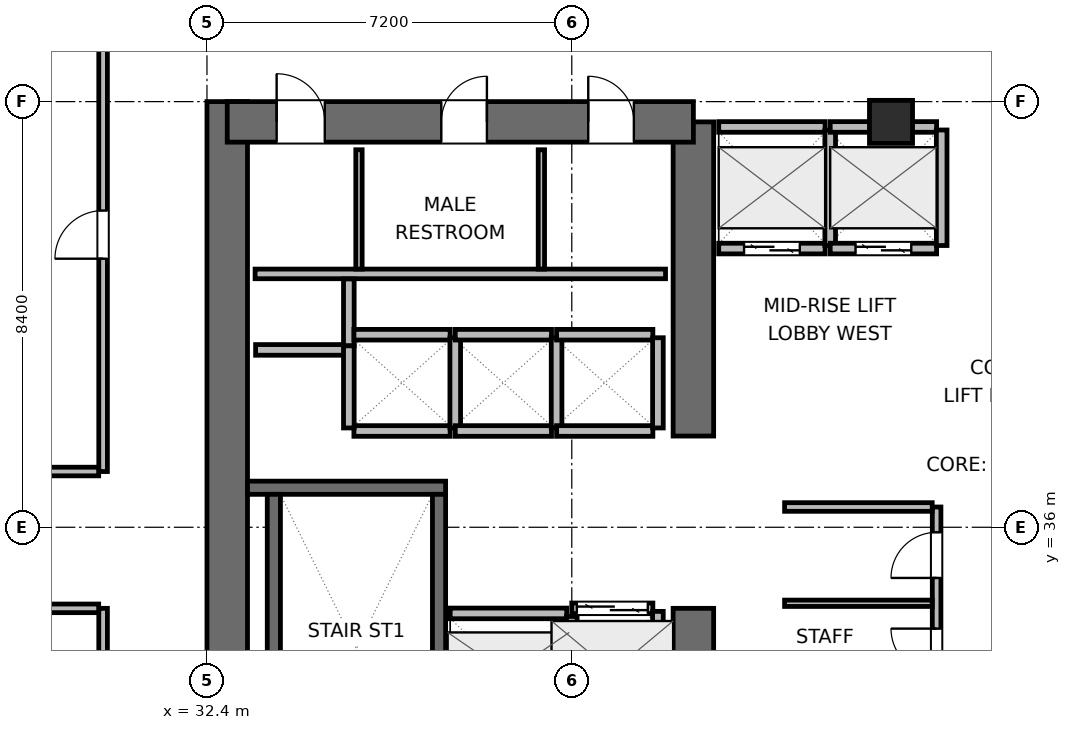
"""IFC4 building model, lengths in metres.
Left out: names, types, materials, properties, quantities, classifications, styles, units other than length and angle.
Written with IfcOpenShell. Run it as: python <this file> out.ifc"""

import sys

from ifc_helpers import new_model, si_unit, direction, frame, frame_2d, origin, origin_2d, place, context, subcontext, project, spatial, rectangle, extrude, element, fill, save


model = new_model("IFC4")
c1 = context("Model", 3, precision=1e-05, world=origin(), true_north=direction((0.0, 1.0)))
c2 = subcontext(c1, "Body", "Model", "MODEL_VIEW")
j1 = project(units=[si_unit("LENGTHUNIT", "METRE"), si_unit("PLANEANGLEUNIT", "RADIAN")], contexts=[c1])
p1 = place(None, origin())
s1 = spatial("IfcSite", under=j1, at=p1, CompositionType="ELEMENT")
p2 = place(p1, origin())
s2 = spatial("IfcBuilding", under=s1, at=p2, CompositionType="ELEMENT")
p3 = place(p2, frame((0.0, 0.0, 133.8)))
s3 = spatial("IfcBuildingStorey", under=s2, at=p3, CompositionType="ELEMENT", Elevation=133.8)
p4 = place(p3, frame((32.8, 27.6, 0.0), z_axis=(0.0, 0.0, 1.0), x_axis=(0.0, 1.0, 0.0)))
e1 = element("IfcWall", 1, at=p4, inside=s3, PredefinedType="SHEAR", context=c2, shape_type="SweptSolid", body=[
    extrude(rectangle(XDim=16.8, YDim=0.8, at=frame_2d((8.4, 0.0))), origin(), (0.0, 0.0, 1.0), 3.9),
])
p5 = place(p3, frame((42.0, 28.0, 0.0), z_axis=(0.0, 0.0, 1.0), x_axis=(0.0, 1.0, 0.0)))
e2 = element("IfcWall", 2, at=p5, inside=s3, PredefinedType="SHEAR", context=c2, shape_type="SweptSolid", body=[
    extrude(rectangle(XDim=6.4, YDim=0.8, at=frame_2d((3.2, 0.0))), origin(), (0.0, 0.0, 1.0), 3.9),
])
p6 = place(p3, frame((42.0, 37.8, 0.0), z_axis=(0.0, 0.0, 1.0), x_axis=(0.0, 1.0, 0.0)))
e3 = element("IfcWall", 3, at=p6, inside=s3, PredefinedType="SHEAR", context=c2, shape_type="SweptSolid", body=[
    extrude(rectangle(XDim=6.2, YDim=0.8, at=frame_2d((3.1, 0.0))), origin(), (0.0, 0.0, 1.0), 3.9),
])
p7 = place(p3, frame((32.8, 44.0, 0.0), z_axis=(0.0, 0.0, 1.0), x_axis=(1.0, 0.0, 0.0)))
e4 = element("IfcWall", 4, at=p7, inside=s3, PredefinedType="SHEAR", context=c2, shape_type="SweptSolid", body=[
    extrude(rectangle(XDim=9.2, YDim=0.8, at=frame_2d((4.6, 0.0))), origin(), (0.0, 0.0, 1.0), 3.9),
])
p8 = place(p7, frame((0.975, 0.0, 0.0)))
e5 = element("IfcOpeningElement", 5, at=p8, cuts=e4, PredefinedType="OPENING", context=c2, shape_type="SweptSolid", body=[
    extrude(rectangle(XDim=0.95, YDim=2.04, at=frame_2d((0.475, 1.02))), frame((0.0, 0.41, 0.0), z_axis=(0.0, -1.0, 0.0), x_axis=(1.0, 0.0, 0.0)), (0.0, 0.0, 1.0), 0.82),
])
p9 = place(p7, frame((4.225, 0.0, 0.0)))
e6 = element("IfcOpeningElement", 6, at=p9, cuts=e4, PredefinedType="OPENING", context=c2, shape_type="SweptSolid", body=[
    extrude(rectangle(XDim=0.9, YDim=2.02, at=frame_2d((0.45, 1.01))), frame((0.0, 0.41, 0.0), z_axis=(0.0, -1.0, 0.0), x_axis=(1.0, 0.0, 0.0)), (0.0, 0.0, 1.0), 0.82),
])
p10 = place(p7, frame((7.125, 0.0, 0.0)))
e7 = element("IfcOpeningElement", 7, at=p10, cuts=e4, PredefinedType="OPENING", context=c2, shape_type="SweptSolid", body=[
    extrude(rectangle(XDim=0.9, YDim=2.02, at=frame_2d((0.45, 1.01))), frame((0.0, 0.41, 0.0), z_axis=(0.0, -1.0, 0.0), x_axis=(1.0, 0.0, 0.0)), (0.0, 0.0, 1.0), 0.82),
])
p11 = place(p3, frame((33.2, 36.78, 0.0), z_axis=(0.0, 0.0, 1.0), x_axis=(1.0, 0.0, 0.0)))
e8 = element("IfcWall", 8, at=p11, inside=s3, PredefinedType="SHEAR", context=c2, shape_type="SweptSolid", body=[
    extrude(rectangle(XDim=3.91, YDim=0.26, at=frame_2d((1.955, 0.0))), origin(), (0.0, 0.0, 1.0), 3.9),
])
p12 = place(p3, frame((33.72, 29.05, 0.0), z_axis=(0.0, 0.0, 1.0), x_axis=(0.0, 1.0, 0.0)))
e9 = element("IfcWall", 9, at=p12, inside=s3, PredefinedType="SHEAR", context=c2, shape_type="SweptSolid", body=[
    extrude(rectangle(XDim=7.6, YDim=0.26, at=frame_2d((3.8, 0.0))), origin(), (0.0, 0.0, 1.0), 3.9),
])
p13 = place(p3, frame((36.98, 29.05, 0.0), z_axis=(0.0, 0.0, 1.0), x_axis=(0.0, 1.0, 0.0)))
e10 = element("IfcWall", 10, at=p13, inside=s3, PredefinedType="SHEAR", context=c2, shape_type="SweptSolid", body=[
    extrude(rectangle(XDim=7.6, YDim=0.26, at=frame_2d((3.8, 0.0))), origin(), (0.0, 0.0, 1.0), 3.9),
])
p14 = place(p13, frame((0.3, 0.0, 0.0)))
e11 = element("IfcOpeningElement", 11, at=p14, cuts=e10, PredefinedType="OPENING", context=c2, shape_type="SweptSolid", body=[
    extrude(rectangle(XDim=1.0, YDim=2.04, at=frame_2d((0.5, 1.02))), frame((0.0, 0.14, 0.0), z_axis=(0.0, -1.0, 0.0), x_axis=(1.0, 0.0, 0.0)), (0.0, 0.0, 1.0), 0.28),
])
p15 = place(p3, frame((45.9, 44.0, 0.0), z_axis=(0.0, 0.0, 1.0), x_axis=(1.0, 0.0, 0.0)))
e12 = element("IfcColumn", 12, at=p15, inside=s3, PredefinedType="COLUMN", context=c2, shape_type="SweptSolid", body=[
    extrude(rectangle(XDim=0.85, YDim=0.85, at=origin_2d()), origin(), (0.0, 0.0, 1.0), 3.9),
])
p16 = place(p3, frame((33.35, 41.0, 0.0), z_axis=(0.0, 0.0, 1.0), x_axis=(1.0, 0.0, 0.0)))
e13 = element("IfcWall", 13, at=p16, inside=s3, PredefinedType="PLUMBINGWALL", context=c2, shape_type="SweptSolid", body=[
    extrude(rectangle(XDim=8.1, YDim=0.19, at=frame_2d((4.05, 0.0))), origin(), (0.0, 0.0, 1.0), 3.64),
])
for number, where, z_axis, x_axis in (
    (14, (35.4, 41.095, 0.0), (0.0, 0.0, 1.0), (0.0, 1.0, 0.0)),
    (15, (39.0, 41.095, 0.0), (0.0, 0.0, 1.0), (0.0, 1.0, 0.0)),
):
    element("IfcWall", number, at=place(p3, frame(where, z_axis=z_axis, x_axis=x_axis)), inside=s3, PredefinedType="PARTITIONING", context=c2, shape_type="SweptSolid", body=[
        extrude(rectangle(XDim=2.355, YDim=0.125, at=frame_2d((1.177, 0.0))), origin(), (0.0, 0.0, 1.0), 3.64),
    ])
p17 = place(p3, frame((33.36, 39.5, 0.0), z_axis=(0.0, 0.0, 1.0), x_axis=(1.0, 0.0, 0.0)))
e16 = element("IfcWall", 16, at=p17, inside=s3, PredefinedType="PARTITIONING", context=c2, shape_type="SweptSolid", body=[
    extrude(rectangle(XDim=1.86, YDim=0.21, at=frame_2d((0.93, 0.0))), origin(), (0.0, 0.0, 1.0), 3.64),
])
p18 = place(p3, frame((35.2, 39.58, 0.0), z_axis=(0.0, 0.0, 1.0), x_axis=(0.0, 1.0, 0.0)))
e17 = element("IfcWall", 17, at=p18, inside=s3, PredefinedType="PARTITIONING", context=c2, shape_type="SweptSolid", body=[
    extrude(rectangle(XDim=1.32, YDim=0.21, at=frame_2d((0.66, 0.0))), origin(), (0.0, 0.0, 1.0), 3.64),
])
p19 = place(p3, frame((37.2, 34.3, 0.0), z_axis=(0.0, 0.0, 1.0), x_axis=(1.0, 0.0, 0.0)))
e18 = element("IfcWall", 18, at=p19, inside=s3, PredefinedType="PARTITIONING", context=c2, shape_type="SweptSolid", body=[
    extrude(rectangle(XDim=2.3, YDim=0.21, at=frame_2d((1.15, 0.0))), origin(), (0.0, 0.0, 1.0), 3.64),
])
p20 = place(p3, frame((39.6, 31.96, 0.0), z_axis=(0.0, 0.0, 1.0), x_axis=(0.0, 1.0, 0.0)))
e19 = element("IfcWall", 19, at=p20, inside=s3, PredefinedType="PARTITIONING", context=c2, shape_type="SweptSolid", body=[
    extrude(rectangle(XDim=2.28, YDim=0.21, at=frame_2d((1.14, 0.0))), origin(), (0.0, 0.0, 1.0), 3.64),
])
p21 = place(p3, frame((39.6, 34.4, 0.0), z_axis=(0.0, 0.0, 1.0), x_axis=(1.0, 0.0, 0.0)))
e20 = element("IfcWall", 20, at=p21, inside=s3, PredefinedType="PARTITIONING", context=c2, shape_type="SweptSolid", body=[
    extrude(rectangle(XDim=1.6, YDim=0.21, at=frame_2d((0.8, 0.0))), origin(), (0.0, 0.0, 1.0), 3.64),
])
p22 = place(p21, frame((0.1, 0.0, 0.0)))
e21 = element("IfcOpeningElement", 21, at=p22, cuts=e20, PredefinedType="OPENING", context=c2, shape_type="SweptSolid", body=[
    extrude(rectangle(XDim=1.4, YDim=2.06, at=frame_2d((0.7, 1.03))), frame((0.0, 0.115, 0.0), z_axis=(0.0, -1.0, 0.0), x_axis=(1.0, 0.0, 0.0)), (0.0, 0.0, 1.0), 0.23),
])
p23 = place(p3, frame((41.3, 31.96, 0.0), z_axis=(0.0, 0.0, 1.0), x_axis=(0.0, 1.0, 0.0)))
e22 = element("IfcWall", 22, at=p23, inside=s3, PredefinedType="PARTITIONING", context=c2, shape_type="SweptSolid", body=[
    extrude(rectangle(XDim=2.38, YDim=0.21, at=frame_2d((1.19, 0.0))), origin(), (0.0, 0.0, 1.0), 3.64),
])
p24 = place(p3, frame((42.5, 41.5, 0.0), z_axis=(0.0, 0.0, 1.0), x_axis=(1.0, 0.0, 0.0)))
e23 = element("IfcWall", 23, at=p24, inside=s3, PredefinedType="PARTITIONING", context=c2, shape_type="SweptSolid", body=[
    extrude(rectangle(XDim=2.1, YDim=0.21, at=frame_2d((1.05, 0.0))), origin(), (0.0, 0.0, 1.0), 3.64),
])
p25 = place(p24, frame((0.5, 0.0, 0.0)))
e24 = element("IfcOpeningElement", 24, at=p25, cuts=e23, PredefinedType="OPENING", context=c2, shape_type="SweptSolid", body=[
    extrude(rectangle(XDim=1.1, YDim=2.04, at=frame_2d((0.55, 1.02))), frame((0.0, 0.115, 0.0), z_axis=(0.0, -1.0, 0.0), x_axis=(1.0, 0.0, 0.0)), (0.0, 0.0, 1.0), 0.23),
])
p26 = place(p3, frame((42.5, 43.9, 0.0), z_axis=(0.0, 0.0, 1.0), x_axis=(1.0, 0.0, 0.0)))
e25 = element("IfcWall", 25, at=p26, inside=s3, PredefinedType="PARTITIONING", context=c2, shape_type="SweptSolid", body=[
    extrude(rectangle(XDim=2.1, YDim=0.21, at=frame_2d((1.05, 0.0))), origin(), (0.0, 0.0, 1.0), 2.525),
])
p27 = place(p3, frame((44.7, 41.56, 0.0), z_axis=(0.0, 0.0, 1.0), x_axis=(0.0, 1.0, 0.0)))
e26 = element("IfcWall", 26, at=p27, inside=s3, PredefinedType="PARTITIONING", context=c2, shape_type="SweptSolid", body=[
    extrude(rectangle(XDim=2.28, YDim=0.21, at=frame_2d((1.14, 0.0))), origin(), (0.0, 0.0, 1.0), 3.64),
])
p28 = place(p3, frame((44.7, 41.5, 0.0), z_axis=(0.0, 0.0, 1.0), x_axis=(1.0, 0.0, 0.0)))
e27 = element("IfcWall", 27, at=p28, inside=s3, PredefinedType="PARTITIONING", context=c2, shape_type="SweptSolid", body=[
    extrude(rectangle(XDim=2.1, YDim=0.21, at=frame_2d((1.05, 0.0))), origin(), (0.0, 0.0, 1.0), 3.64),
])
p29 = place(p28, frame((0.5, 0.0, 0.0)))
e28 = element("IfcOpeningElement", 28, at=p29, cuts=e27, PredefinedType="OPENING", context=c2, shape_type="SweptSolid", body=[
    extrude(rectangle(XDim=1.1, YDim=2.04, at=frame_2d((0.55, 1.02))), frame((0.0, 0.115, 0.0), z_axis=(0.0, -1.0, 0.0), x_axis=(1.0, 0.0, 0.0)), (0.0, 0.0, 1.0), 0.23),
])
p30 = place(p3, frame((44.7, 43.9, 0.0), z_axis=(0.0, 0.0, 1.0), x_axis=(1.0, 0.0, 0.0)))
e29 = element("IfcWall", 29, at=p30, inside=s3, PredefinedType="PARTITIONING", context=c2, shape_type="SweptSolid", body=[
    extrude(rectangle(XDim=2.1, YDim=0.21, at=frame_2d((1.05, 0.0))), origin(), (0.0, 0.0, 1.0), 2.525),
])
p31 = place(p3, frame((46.9, 41.56, 0.0), z_axis=(0.0, 0.0, 1.0), x_axis=(0.0, 1.0, 0.0)))
e30 = element("IfcWall", 30, at=p31, inside=s3, PredefinedType="PARTITIONING", context=c2, shape_type="SweptSolid", body=[
    extrude(rectangle(XDim=2.28, YDim=0.21, at=frame_2d((1.14, 0.0))), origin(), (0.0, 0.0, 1.0), 3.64),
])
for number, where, z_axis, x_axis in (
    (31, (35.3, 37.9, 0.0), (0.0, 0.0, 1.0), (1.0, 0.0, 0.0)),
    (32, (35.3, 39.8, 0.0), (0.0, 0.0, 1.0), (1.0, 0.0, 0.0)),
):
    element("IfcWall", number, at=place(p3, frame(where, z_axis=z_axis, x_axis=x_axis)), inside=s3, PredefinedType="PARTITIONING", context=c2, shape_type="SweptSolid", body=[
        extrude(rectangle(XDim=1.9, YDim=0.21, at=frame_2d((0.95, 0.0))), origin(), (0.0, 0.0, 1.0), 3.64),
    ])
p32 = place(p3, frame((35.2, 37.96, 0.0), z_axis=(0.0, 0.0, 1.0), x_axis=(0.0, 1.0, 0.0)))
e33 = element("IfcWall", 33, at=p32, inside=s3, PredefinedType="PARTITIONING", context=c2, shape_type="SweptSolid", body=[
    extrude(rectangle(XDim=1.62, YDim=0.21, at=frame_2d((0.81, 0.0))), origin(), (0.0, 0.0, 1.0), 3.64),
])
p33 = place(p3, frame((37.3, 37.96, 0.0), z_axis=(0.0, 0.0, 1.0), x_axis=(0.0, 1.0, 0.0)))
e34 = element("IfcWall", 34, at=p33, inside=s3, PredefinedType="PARTITIONING", context=c2, shape_type="SweptSolid", body=[
    extrude(rectangle(XDim=1.78, YDim=0.21, at=frame_2d((0.89, 0.0))), origin(), (0.0, 0.0, 1.0), 3.64),
])
for number, where, z_axis, x_axis in (
    (35, (37.3, 37.9, 0.0), (0.0, 0.0, 1.0), (1.0, 0.0, 0.0)),
    (36, (37.3, 39.8, 0.0), (0.0, 0.0, 1.0), (1.0, 0.0, 0.0)),
):
    element("IfcWall", number, at=place(p3, frame(where, z_axis=z_axis, x_axis=x_axis)), inside=s3, PredefinedType="PARTITIONING", context=c2, shape_type="SweptSolid", body=[
        extrude(rectangle(XDim=1.9, YDim=0.21, at=frame_2d((0.95, 0.0))), origin(), (0.0, 0.0, 1.0), 3.64),
    ])
p34 = place(p3, frame((39.3, 37.96, 0.0), z_axis=(0.0, 0.0, 1.0), x_axis=(0.0, 1.0, 0.0)))
e37 = element("IfcWall", 37, at=p34, inside=s3, PredefinedType="PARTITIONING", context=c2, shape_type="SweptSolid", body=[
    extrude(rectangle(XDim=1.78, YDim=0.21, at=frame_2d((0.89, 0.0))), origin(), (0.0, 0.0, 1.0), 3.64),
])
for number, where, z_axis, x_axis in (
    (38, (39.3, 37.9, 0.0), (0.0, 0.0, 1.0), (1.0, 0.0, 0.0)),
    (39, (39.3, 39.8, 0.0), (0.0, 0.0, 1.0), (1.0, 0.0, 0.0)),
):
    element("IfcWall", number, at=place(p3, frame(where, z_axis=z_axis, x_axis=x_axis)), inside=s3, PredefinedType="PARTITIONING", context=c2, shape_type="SweptSolid", body=[
        extrude(rectangle(XDim=1.9, YDim=0.21, at=frame_2d((0.95, 0.0))), origin(), (0.0, 0.0, 1.0), 3.64),
    ])
p35 = place(p3, frame((41.3, 37.96, 0.0), z_axis=(0.0, 0.0, 1.0), x_axis=(0.0, 1.0, 0.0)))
e40 = element("IfcWall", 40, at=p35, inside=s3, PredefinedType="PARTITIONING", context=c2, shape_type="SweptSolid", body=[
    extrude(rectangle(XDim=1.78, YDim=0.21, at=frame_2d((0.89, 0.0))), origin(), (0.0, 0.0, 1.0), 3.64),
])
p36 = place(p3, frame((46.8, 32.6, 0.0), z_axis=(0.0, 0.0, 1.0), x_axis=(0.0, 1.0, 0.0)))
e41 = element("IfcWall", 41, at=p36, inside=s3, PredefinedType="PARTITIONING", context=c2, shape_type="SweptSolid", body=[
    extrude(rectangle(XDim=3.8, YDim=0.17, at=frame_2d((1.9, 0.0))), origin(), (0.0, 0.0, 1.0), 3.64),
])
p37 = place(p36, frame((0.5, 0.0, 0.0)))
e42 = element("IfcOpeningElement", 42, at=p37, cuts=e41, PredefinedType="OPENING", context=c2, shape_type="SweptSolid", body=[
    extrude(rectangle(XDim=0.9, YDim=2.02, at=frame_2d((0.45, 1.01))), frame((0.0, 0.095, 0.0), z_axis=(0.0, -1.0, 0.0), x_axis=(1.0, 0.0, 0.0)), (0.0, 0.0, 1.0), 0.19),
])
p38 = place(p36, frame((2.4, 0.0, 0.0)))
e43 = element("IfcOpeningElement", 43, at=p38, cuts=e41, PredefinedType="OPENING", context=c2, shape_type="SweptSolid", body=[
    extrude(rectangle(XDim=0.9, YDim=2.02, at=frame_2d((0.45, 1.01))), frame((0.0, 0.095, 0.0), z_axis=(0.0, -1.0, 0.0), x_axis=(1.0, 0.0, 0.0)), (0.0, 0.0, 1.0), 0.19),
])
p39 = place(p3, frame((43.8, 36.4, 0.0), z_axis=(0.0, 0.0, 1.0), x_axis=(1.0, 0.0, 0.0)))
e44 = element("IfcWall", 44, at=p39, inside=s3, PredefinedType="PARTITIONING", context=c2, shape_type="SweptSolid", body=[
    extrude(rectangle(XDim=2.913, YDim=0.17, at=frame_2d((1.457, 0.0))), origin(), (0.0, 0.0, 1.0), 3.64),
])
p40 = place(p3, frame((43.8, 34.5, 0.0), z_axis=(0.0, 0.0, 1.0), x_axis=(1.0, 0.0, 0.0)))
e45 = element("IfcWall", 45, at=p40, inside=s3, PredefinedType="PARTITIONING", context=c2, shape_type="SweptSolid", body=[
    extrude(rectangle(XDim=2.913, YDim=0.125, at=frame_2d((1.457, 0.0))), origin(), (0.0, 0.0, 1.0), 3.64),
])
p41 = place(p3, frame((30.35, 25.637, 0.0), z_axis=(0.0, 0.0, 1.0), x_axis=(0.0, 1.0, 0.0)))
e46 = element("IfcWall", 46, at=p41, inside=s3, PredefinedType="PARTITIONING", context=c2, shape_type="SweptSolid", body=[
    extrude(rectangle(XDim=8.763, YDim=0.17, at=frame_2d((4.381, 0.0))), origin(), (0.0, 0.0, 1.0), 3.64),
])
p42 = place(p41, frame((3.863, 0.0, 0.0)))
e47 = element("IfcOpeningElement", 47, at=p42, cuts=e46, PredefinedType="OPENING", context=c2, shape_type="SweptSolid", body=[
    extrude(rectangle(XDim=0.95, YDim=2.04, at=frame_2d((0.475, 1.02))), frame((0.0, 0.095, 0.0), z_axis=(0.0, -1.0, 0.0), x_axis=(1.0, 0.0, 0.0)), (0.0, 0.0, 1.0), 0.19),
])
p43 = place(p3, frame((30.35, 37.1, 0.0), z_axis=(0.0, 0.0, 1.0), x_axis=(0.0, 1.0, 0.0)))
e48 = element("IfcWall", 48, at=p43, inside=s3, PredefinedType="PARTITIONING", context=c2, shape_type="SweptSolid", body=[
    extrude(rectangle(XDim=9.263, YDim=0.17, at=frame_2d((4.631, 0.0))), origin(), (0.0, 0.0, 1.0), 3.64),
])
p44 = place(p43, frame((4.2, 0.0, 0.0)))
e49 = element("IfcOpeningElement", 49, at=p44, cuts=e48, PredefinedType="OPENING", context=c2, shape_type="SweptSolid", body=[
    extrude(rectangle(XDim=0.95, YDim=2.04, at=frame_2d((0.475, 1.02))), frame((0.0, 0.095, 0.0), z_axis=(0.0, -1.0, 0.0), x_axis=(1.0, 0.0, 0.0)), (0.0, 0.0, 1.0), 0.19),
])
p45 = place(p3, frame((20.26, 34.4, 0.0), z_axis=(0.0, 0.0, 1.0), x_axis=(1.0, 0.0, 0.0)))
e50 = element("IfcWall", 50, at=p45, inside=s3, PredefinedType="PARTITIONING", context=c2, shape_type="SweptSolid", body=[
    extrude(rectangle(XDim=10.003, YDim=0.17, at=frame_2d((5.001, 0.0))), origin(), (0.0, 0.0, 1.0), 3.64),
])
p46 = place(p3, frame((18.245, 37.1, 0.0), z_axis=(0.0, 0.0, 1.0), x_axis=(1.0, 0.0, 0.0)))
e51 = element("IfcWall", 51, at=p46, inside=s3, PredefinedType="PARTITIONING", context=c2, shape_type="SweptSolid", body=[
    extrude(rectangle(XDim=12.018, YDim=0.17, at=frame_2d((6.009, 0.0))), origin(), (0.0, 0.0, 1.0), 3.64),
])
p47 = place(p22, origin())
e52 = element("IfcDoor", 52, at=p47, inside=s3, OperationType="DOUBLE_DOOR_SLIDING", PredefinedType="DOOR", context=c2, shape_type="SweptSolid", body=[
    extrude(rectangle(XDim=1.4, YDim=2.06, at=frame_2d((0.7, 1.03))), frame((0.0, 0.025, 0.0), z_axis=(0.0, -1.0, 0.0), x_axis=(1.0, 0.0, 0.0)), (0.0, 0.0, 1.0), 0.05),
])
fill(e21, e52)
p48 = place(p25, origin())
e53 = element("IfcDoor", 53, at=p48, inside=s3, OperationType="DOUBLE_DOOR_SLIDING", PredefinedType="DOOR", context=c2, shape_type="SweptSolid", body=[
    extrude(rectangle(XDim=1.1, YDim=2.04, at=frame_2d((0.55, 1.02))), frame((0.0, 0.025, 0.0), z_axis=(0.0, -1.0, 0.0), x_axis=(1.0, 0.0, 0.0)), (0.0, 0.0, 1.0), 0.05),
])
fill(e24, e53)
p49 = place(p29, origin())
e54 = element("IfcDoor", 54, at=p49, inside=s3, OperationType="DOUBLE_DOOR_SLIDING", PredefinedType="DOOR", context=c2, shape_type="SweptSolid", body=[
    extrude(rectangle(XDim=1.1, YDim=2.04, at=frame_2d((0.55, 1.02))), frame((0.0, 0.025, 0.0), z_axis=(0.0, -1.0, 0.0), x_axis=(1.0, 0.0, 0.0)), (0.0, 0.0, 1.0), 0.05),
])
fill(e28, e54)
p50 = place(p8, origin())
e55 = element("IfcDoor", 55, at=p50, inside=s3, OperationType="SINGLE_SWING_LEFT", PredefinedType="DOOR", context=c2, shape_type="SweptSolid", body=[
    extrude(rectangle(XDim=0.95, YDim=2.04, at=frame_2d((0.475, 1.02))), frame((0.0, 0.025, 0.0), z_axis=(0.0, -1.0, 0.0), x_axis=(1.0, 0.0, 0.0)), (0.0, 0.0, 1.0), 0.05),
])
fill(e5, e55)
p51 = place(p9, origin())
e56 = element("IfcDoor", 56, at=p51, inside=s3, OperationType="SINGLE_SWING_RIGHT", PredefinedType="DOOR", context=c2, shape_type="SweptSolid", body=[
    extrude(rectangle(XDim=0.9, YDim=2.02, at=frame_2d((0.45, 1.01))), frame((0.0, 0.025, 0.0), z_axis=(0.0, -1.0, 0.0), x_axis=(1.0, 0.0, 0.0)), (0.0, 0.0, 1.0), 0.05),
])
fill(e6, e56)
p52 = place(p10, origin())
e57 = element("IfcDoor", 57, at=p52, inside=s3, OperationType="SINGLE_SWING_LEFT", PredefinedType="DOOR", context=c2, shape_type="SweptSolid", body=[
    extrude(rectangle(XDim=0.9, YDim=2.02, at=frame_2d((0.45, 1.01))), frame((0.0, 0.025, 0.0), z_axis=(0.0, -1.0, 0.0), x_axis=(1.0, 0.0, 0.0)), (0.0, 0.0, 1.0), 0.05),
])
fill(e7, e57)
p53 = place(p37, origin())
e58 = element("IfcDoor", 58, at=p53, inside=s3, OperationType="SINGLE_SWING_RIGHT", PredefinedType="DOOR", context=c2, shape_type="SweptSolid", body=[
    extrude(rectangle(XDim=0.9, YDim=2.02, at=frame_2d((0.45, 1.01))), frame((0.0, 0.025, 0.0), z_axis=(0.0, -1.0, 0.0), x_axis=(1.0, 0.0, 0.0)), (0.0, 0.0, 1.0), 0.05),
])
fill(e42, e58)
p54 = place(p38, origin())
e59 = element("IfcDoor", 59, at=p54, inside=s3, OperationType="SINGLE_SWING_LEFT", PredefinedType="DOOR", context=c2, shape_type="SweptSolid", body=[
    extrude(rectangle(XDim=0.9, YDim=2.02, at=frame_2d((0.45, 1.01))), frame((0.0, 0.025, 0.0), z_axis=(0.0, -1.0, 0.0), x_axis=(1.0, 0.0, 0.0)), (0.0, 0.0, 1.0), 0.05),
])
fill(e43, e59)
p55 = place(p44, origin())
e60 = element("IfcDoor", 60, at=p55, inside=s3, OperationType="SINGLE_SWING_LEFT", PredefinedType="DOOR", context=c2, shape_type="SweptSolid", body=[
    extrude(rectangle(XDim=0.95, YDim=2.04, at=frame_2d((0.475, 1.02))), frame((0.0, 0.025, 0.0), z_axis=(0.0, -1.0, 0.0), x_axis=(1.0, 0.0, 0.0)), (0.0, 0.0, 1.0), 0.05),
])
fill(e49, e60)
save(model, sys.argv[1])
